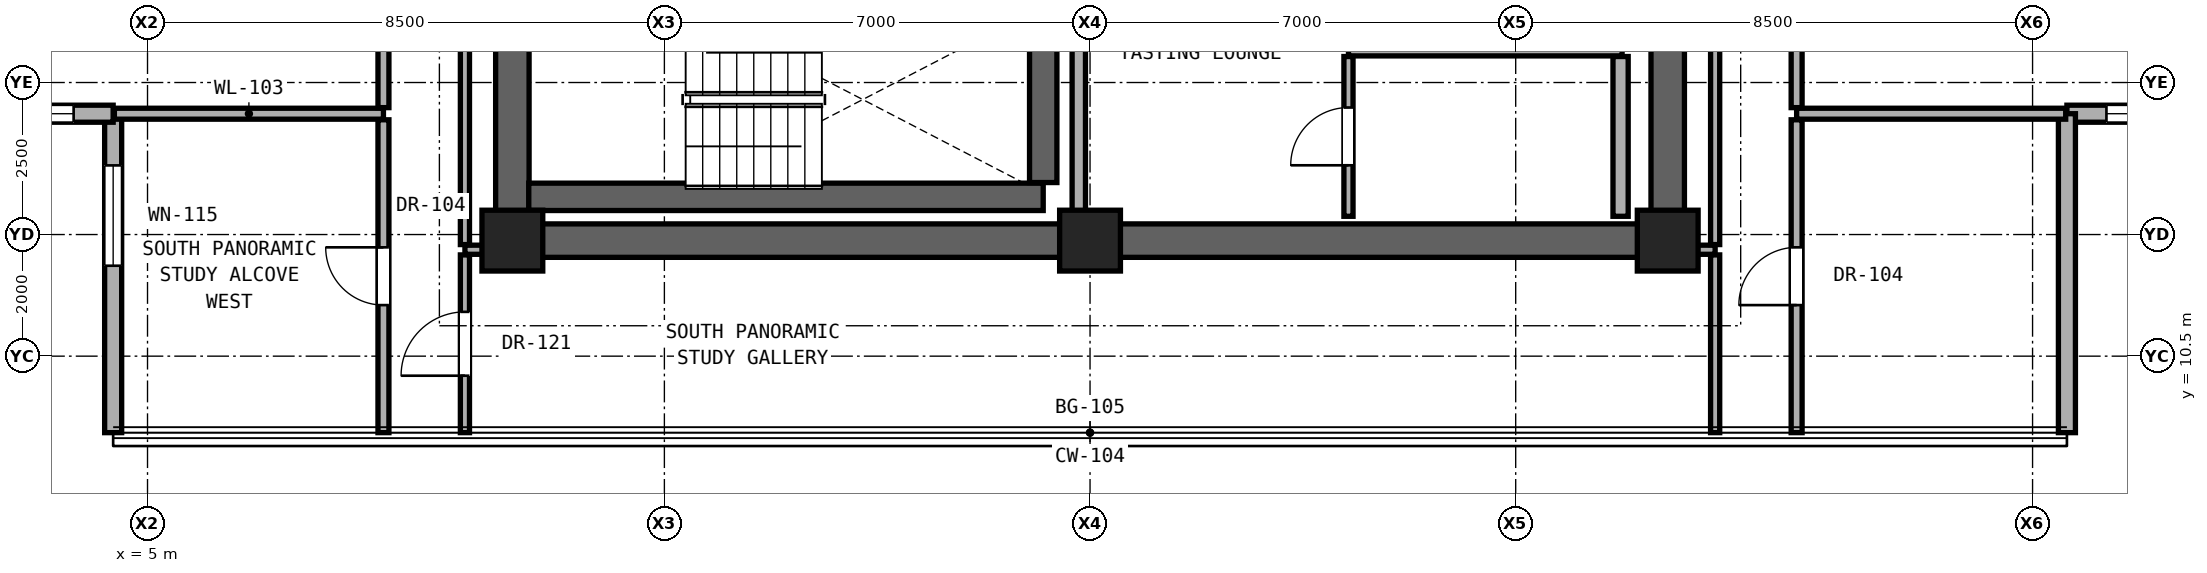
"""IFC4 building model, lengths in metres.
Left out: names, types, materials, properties, quantities, classifications, styles, units other than length and angle.
Written with IfcOpenShell. Run it as: python <this file> out.ifc"""

import sys

from ifc_helpers import new_model, si_unit, direction, frame, frame_2d, origin, origin_2d, place, context, subcontext, project, spatial, rectangle, extrude, element, fill, save


model = new_model("IFC4")
c1 = context("Model", 3, precision=1e-05, world=origin(), true_north=direction((0.0, 1.0)))
c2 = subcontext(c1, "Body", "Model", "MODEL_VIEW")
j1 = project(units=[si_unit("LENGTHUNIT", "METRE"), si_unit("PLANEANGLEUNIT", "RADIAN")], contexts=[c1])
p1 = place(None, origin())
s1 = spatial("IfcSite", under=j1, at=p1, CompositionType="ELEMENT")
p2 = place(p1, origin())
s2 = spatial("IfcBuilding", under=s1, at=p2, CompositionType="ELEMENT")
p3 = place(p2, frame((0.0, 0.0, 173.9)))
s3 = spatial("IfcBuildingStorey", under=s2, at=p3, CompositionType="ELEMENT", Elevation=173.9)
for number, where, z_axis, x_axis in (
    (1, (11.0, 12.4, 0.0), (0.0, 0.0, 1.0), (1.0, 0.0, 0.0)),
    (2, (20.5, 12.4, 0.0), (0.0, 0.0, 1.0), (1.0, 0.0, 0.0)),
    (3, (30.0, 12.4, 0.0), (0.0, 0.0, 1.0), (1.0, 0.0, 0.0)),
):
    element("IfcColumn", number, at=place(p3, frame(where, z_axis=z_axis, x_axis=x_axis)), inside=s3, PredefinedType="COLUMN", context=c2, shape_type="SweptSolid", body=[
        extrude(rectangle(XDim=1.0, YDim=1.0, at=origin_2d()), origin(), (0.0, 0.0, 1.0), 3.25),
    ])
p4 = place(p3, frame((11.0, 12.4, 0.0), z_axis=(0.0, 0.0, 1.0), x_axis=(1.0, 0.0, 0.0)))
e4 = element("IfcWall", 4, at=p4, inside=s3, PredefinedType="SHEAR", context=c2, shape_type="SweptSolid", body=[
    extrude(rectangle(XDim=19.0, YDim=0.55, at=frame_2d((9.5, 0.0))), origin(), (0.0, 0.0, 1.0), 3.05),
])
for number, where, z_axis, x_axis in (
    (5, (11.0, 12.4, 0.0), (0.0, 0.0, 1.0), (0.0, 1.0, 0.0)),
    (6, (30.0, 12.4, 0.0), (0.0, 0.0, 1.0), (0.0, 1.0, 0.0)),
):
    element("IfcWall", number, at=place(p3, frame(where, z_axis=z_axis, x_axis=x_axis)), inside=s3, PredefinedType="SHEAR", context=c2, shape_type="SweptSolid", body=[
        extrude(rectangle(XDim=6.0, YDim=0.55, at=frame_2d((3.0, 0.0))), origin(), (0.0, 0.0, 1.0), 3.05),
    ])
p5 = place(p3, frame((4.435, 14.487, 0.0), z_axis=(0.0, 0.0, 1.0), x_axis=(0.0, -1.0, 0.0)))
e7 = element("IfcWall", 7, at=p5, inside=s3, PredefinedType="SOLIDWALL", context=c2, shape_type="SweptSolid", body=[
    extrude(rectangle(XDim=5.245, YDim=0.28, at=frame_2d((2.623, 0.0))), origin(), (0.0, 0.0, 1.0), 3.03),
])
p6 = place(p5, frame((0.85, 0.0, 0.68)))
e8 = element("IfcOpeningElement", 8, at=p6, cuts=e7, PredefinedType="OPENING", context=c2, shape_type="SweptSolid", body=[
    extrude(rectangle(XDim=1.65, YDim=2.2, at=frame_2d((0.825, 1.1))), frame((0.0, 0.15, 0.0), z_axis=(0.0, -1.0, 0.0), x_axis=(1.0, 0.0, 0.0)), (0.0, 0.0, 1.0), 0.3),
])
p7 = place(p3, frame((-0.81, 14.487, 0.0), z_axis=(0.0, 0.0, 1.0), x_axis=(1.0, 0.0, 0.0)))
e9 = element("IfcWall", 9, at=p7, inside=s3, PredefinedType="SOLIDWALL", context=c2, shape_type="SweptSolid", body=[
    extrude(rectangle(XDim=5.245, YDim=0.28, at=frame_2d((2.623, 0.0))), origin(), (0.0, 0.0, 1.0), 3.03),
])
p8 = place(p7, frame((3.495, 0.0, 0.85)))
e10 = element("IfcOpeningElement", 10, at=p8, cuts=e9, PredefinedType="OPENING", context=c2, shape_type="SweptSolid", body=[
    extrude(rectangle(XDim=1.1, YDim=2.0, at=frame_2d((0.55, 1.0))), frame((0.0, 0.15, 0.0), z_axis=(0.0, -1.0, 0.0), x_axis=(1.0, 0.0, 0.0)), (0.0, 0.0, 1.0), 0.3),
])
p9 = place(p3, frame((36.565, 14.487, 0.0), z_axis=(0.0, 0.0, 1.0), x_axis=(1.0, 0.0, 0.0)))
e11 = element("IfcWall", 11, at=p9, inside=s3, PredefinedType="SOLIDWALL", context=c2, shape_type="SweptSolid", body=[
    extrude(rectangle(XDim=5.245, YDim=0.28, at=frame_2d((2.623, 0.0))), origin(), (0.0, 0.0, 1.0), 3.03),
])
p10 = place(p9, frame((0.65, 0.0, 0.85)))
e12 = element("IfcOpeningElement", 12, at=p10, cuts=e11, PredefinedType="OPENING", context=c2, shape_type="SweptSolid", body=[
    extrude(rectangle(XDim=1.1, YDim=2.0, at=frame_2d((0.55, 1.0))), frame((0.0, 0.15, 0.0), z_axis=(0.0, -1.0, 0.0), x_axis=(1.0, 0.0, 0.0)), (0.0, 0.0, 1.0), 0.3),
])
p11 = place(p3, frame((36.565, 9.242, 0.0), z_axis=(0.0, 0.0, 1.0), x_axis=(0.0, 1.0, 0.0)))
e13 = element("IfcWall", 13, at=p11, inside=s3, PredefinedType="SOLIDWALL", context=c2, shape_type="SweptSolid", body=[
    extrude(rectangle(XDim=5.245, YDim=0.28, at=frame_2d((2.623, 0.0))), origin(), (0.0, 0.0, 1.0), 3.03),
])
for number, where, z_axis, x_axis in (
    (14, (10.22, 12.25, 0.0), (0.0, 0.0, 1.0), (1.0, 0.0, 0.0)),
    (15, (30.27, 12.25, 0.0), (0.0, 0.0, 1.0), (1.0, 0.0, 0.0)),
):
    element("IfcWall", number, at=place(p3, frame(where, z_axis=z_axis, x_axis=x_axis)), inside=s3, PredefinedType="PARTITIONING", context=c2, shape_type="SweptSolid", body=[
        extrude(rectangle(XDim=0.51, YDim=0.15, at=frame_2d((0.255, 0.0))), origin(), (0.0, 0.0, 1.0), 3.05),
    ])
p12 = place(p3, frame((11.27, 13.12, 0.0), z_axis=(0.0, 0.0, 1.0), x_axis=(1.0, 0.0, 0.0)))
e16 = element("IfcWall", 16, at=p12, inside=s3, PredefinedType="SHEAR", context=c2, shape_type="SweptSolid", body=[
    extrude(rectangle(XDim=8.46, YDim=0.45, at=frame_2d((4.23, 0.0))), origin(), (0.0, 0.0, 1.0), 3.05),
])
for number, where, z_axis, x_axis in (
    (17, (4.455, 14.487, 0.0), (0.0, 0.0, 1.0), (1.0, 0.0, 0.0)),
    (18, (32.12, 14.487, 0.0), (0.0, 0.0, 1.0), (1.0, 0.0, 0.0)),
):
    element("IfcWall", number, at=place(p3, frame(where, z_axis=z_axis, x_axis=x_axis)), inside=s3, PredefinedType="PARTITIONING", context=c2, shape_type="SweptSolid", body=[
        extrude(rectangle(XDim=4.425, YDim=0.18, at=frame_2d((2.212, 0.0))), origin(), (0.0, 0.0, 1.0), 3.05),
    ])
p13 = place(p3, frame((24.75, 15.5, 0.0), z_axis=(0.0, 0.0, 1.0), x_axis=(1.0, 0.0, 0.0)))
e19 = element("IfcWall", 19, at=p13, inside=s3, PredefinedType="PARTITIONING", context=c2, shape_type="SweptSolid", body=[
    extrude(rectangle(XDim=4.5, YDim=0.125, at=frame_2d((2.25, 0.0))), origin(), (0.0, 0.0, 1.0), 3.05),
])
p14 = place(p3, frame((8.88, 9.242, 0.0), z_axis=(0.0, 0.0, 1.0), x_axis=(0.0, 1.0, 0.0)))
e20 = element("IfcWall", 20, at=p14, inside=s3, PredefinedType="PARTITIONING", context=c2, shape_type="SweptSolid", body=[
    extrude(rectangle(XDim=5.145, YDim=0.18, at=frame_2d((2.573, 0.0))), origin(), (0.0, 0.0, 1.0), 3.05),
])
p15 = place(p14, frame((2.097, 0.0, 0.0)))
e21 = element("IfcOpeningElement", 21, at=p15, cuts=e20, PredefinedType="OPENING", context=c2, shape_type="SweptSolid", body=[
    extrude(rectangle(XDim=0.95, YDim=2.15, at=frame_2d((0.475, 1.075))), frame((0.0, 0.1, 0.0), z_axis=(0.0, -1.0, 0.0), x_axis=(1.0, 0.0, 0.0)), (0.0, 0.0, 1.0), 0.2),
])
p16 = place(p3, frame((8.88, 14.587, 0.0), z_axis=(0.0, 0.0, 1.0), x_axis=(0.0, 1.0, 0.0)))
e22 = element("IfcWall", 22, at=p16, inside=s3, PredefinedType="PARTITIONING", context=c2, shape_type="SweptSolid", body=[
    extrude(rectangle(XDim=4.601, YDim=0.18, at=frame_2d((2.301, 0.0))), origin(), (0.0, 0.0, 1.0), 2.442),
])
p17 = place(p16, frame((2.075, 0.0, 0.0)))
e23 = element("IfcOpeningElement", 23, at=p17, cuts=e22, PredefinedType="OPENING", context=c2, shape_type="SweptSolid", body=[
    extrude(rectangle(XDim=1.05, YDim=2.2, at=frame_2d((0.525, 1.1))), frame((0.0, 0.1, 0.0), z_axis=(0.0, -1.0, 0.0), x_axis=(1.0, 0.0, 0.0)), (0.0, 0.0, 1.0), 0.2),
])
p18 = place(p3, frame((10.22, 9.242, 0.0), z_axis=(0.0, 0.0, 1.0), x_axis=(0.0, 1.0, 0.0)))
e24 = element("IfcWall", 24, at=p18, inside=s3, PredefinedType="PARTITIONING", context=c2, shape_type="SweptSolid", body=[
    extrude(rectangle(XDim=2.923, YDim=0.15, at=frame_2d((1.461, 0.0))), origin(), (0.0, 0.0, 1.0), 3.05),
])
p19 = place(p18, frame((0.937, 0.0, 0.0)))
e25 = element("IfcOpeningElement", 25, at=p19, cuts=e24, PredefinedType="OPENING", context=c2, shape_type="SweptSolid", body=[
    extrude(rectangle(XDim=1.05, YDim=2.2, at=frame_2d((0.525, 1.1))), frame((0.0, 0.085, 0.0), z_axis=(0.0, -1.0, 0.0), x_axis=(1.0, 0.0, 0.0)), (0.0, 0.0, 1.0), 0.17),
])
p20 = place(p3, frame((10.22, 12.335, 0.0), z_axis=(0.0, 0.0, 1.0), x_axis=(0.0, 1.0, 0.0)))
e26 = element("IfcWall", 26, at=p20, inside=s3, PredefinedType="PARTITIONING", context=c2, shape_type="SweptSolid", body=[
    extrude(rectangle(XDim=5.98, YDim=0.15, at=frame_2d((2.99, 0.0))), origin(), (0.0, 0.0, 1.0), 2.442),
])
p21 = place(p3, frame((19.73, 13.355, 0.0), z_axis=(0.0, 0.0, 1.0), x_axis=(0.0, 1.0, 0.0)))
e27 = element("IfcWall", 27, at=p21, inside=s3, PredefinedType="SHEAR", context=c2, shape_type="SweptSolid", body=[
    extrude(rectangle(XDim=2.73, YDim=0.45, at=frame_2d((1.365, 0.0))), origin(), (0.0, 0.0, 1.0), 3.05),
])
p22 = place(p3, frame((20.315, 12.8, 0.0), z_axis=(0.0, 0.0, 1.0), x_axis=(0.0, 1.0, 0.0)))
e28 = element("IfcWall", 28, at=p22, inside=s3, PredefinedType="SOLIDWALL", context=c2, shape_type="SweptSolid", body=[
    extrude(rectangle(XDim=3.285, YDim=0.22, at=frame_2d((1.643, 0.0))), origin(), (0.0, 0.0, 1.0), 3.05),
])
p23 = place(p3, frame((24.75, 12.8, 0.0), z_axis=(0.0, 0.0, 1.0), x_axis=(0.0, 1.0, 0.0)))
e29 = element("IfcWall", 29, at=p23, inside=s3, PredefinedType="PARTITIONING", context=c2, shape_type="SweptSolid", body=[
    extrude(rectangle(XDim=2.627, YDim=0.15, at=frame_2d((1.314, 0.0))), origin(), (0.0, 0.0, 1.0), 3.05),
])
p24 = place(p23, frame((0.839, 0.0, 0.0)))
e30 = element("IfcOpeningElement", 30, at=p24, cuts=e29, PredefinedType="OPENING", context=c2, shape_type="SweptSolid", body=[
    extrude(rectangle(XDim=0.95, YDim=2.15, at=frame_2d((0.475, 1.075))), frame((0.0, 0.085, 0.0), z_axis=(0.0, -1.0, 0.0), x_axis=(1.0, 0.0, 0.0)), (0.0, 0.0, 1.0), 0.17),
])
p25 = place(p3, frame((29.225, 12.8, 0.0), z_axis=(0.0, 0.0, 1.0), x_axis=(0.0, 1.0, 0.0)))
e31 = element("IfcWall", 31, at=p25, inside=s3, PredefinedType="SOLIDWALL", context=c2, shape_type="SweptSolid", body=[
    extrude(rectangle(XDim=2.627, YDim=0.25, at=frame_2d((1.314, 0.0))), origin(), (0.0, 0.0, 1.0), 3.05),
])
p26 = place(p3, frame((30.78, 9.242, 0.0), z_axis=(0.0, 0.0, 1.0), x_axis=(0.0, 1.0, 0.0)))
e32 = element("IfcWall", 32, at=p26, inside=s3, PredefinedType="PARTITIONING", context=c2, shape_type="SweptSolid", body=[
    extrude(rectangle(XDim=2.923, YDim=0.15, at=frame_2d((1.461, 0.0))), origin(), (0.0, 0.0, 1.0), 3.05),
])
p27 = place(p3, frame((30.78, 12.335, 0.0), z_axis=(0.0, 0.0, 1.0), x_axis=(0.0, 1.0, 0.0)))
e33 = element("IfcWall", 33, at=p27, inside=s3, PredefinedType="PARTITIONING", context=c2, shape_type="SweptSolid", body=[
    extrude(rectangle(XDim=5.98, YDim=0.15, at=frame_2d((2.99, 0.0))), origin(), (0.0, 0.0, 1.0), 2.442),
])
p28 = place(p3, frame((32.12, 9.242, 0.0), z_axis=(0.0, 0.0, 1.0), x_axis=(0.0, 1.0, 0.0)))
e34 = element("IfcWall", 34, at=p28, inside=s3, PredefinedType="PARTITIONING", context=c2, shape_type="SweptSolid", body=[
    extrude(rectangle(XDim=5.145, YDim=0.18, at=frame_2d((2.573, 0.0))), origin(), (0.0, 0.0, 1.0), 3.05),
])
p29 = place(p28, frame((2.097, 0.0, 0.0)))
e35 = element("IfcOpeningElement", 35, at=p29, cuts=e34, PredefinedType="OPENING", context=c2, shape_type="SweptSolid", body=[
    extrude(rectangle(XDim=0.95, YDim=2.15, at=frame_2d((0.475, 1.075))), frame((0.0, 0.1, 0.0), z_axis=(0.0, -1.0, 0.0), x_axis=(1.0, 0.0, 0.0)), (0.0, 0.0, 1.0), 0.2),
])
p30 = place(p3, frame((32.12, 14.587, 0.0), z_axis=(0.0, 0.0, 1.0), x_axis=(0.0, 1.0, 0.0)))
e36 = element("IfcWall", 36, at=p30, inside=s3, PredefinedType="PARTITIONING", context=c2, shape_type="SweptSolid", body=[
    extrude(rectangle(XDim=4.601, YDim=0.18, at=frame_2d((2.301, 0.0))), origin(), (0.0, 0.0, 1.0), 2.442),
])
p31 = place(p30, frame((2.075, 0.0, 0.0)))
e37 = element("IfcOpeningElement", 37, at=p31, cuts=e36, PredefinedType="OPENING", context=c2, shape_type="SweptSolid", body=[
    extrude(rectangle(XDim=1.05, YDim=2.2, at=frame_2d((0.525, 1.1))), frame((0.0, 0.1, 0.0), z_axis=(0.0, -1.0, 0.0), x_axis=(1.0, 0.0, 0.0)), (0.0, 0.0, 1.0), 0.2),
])
p32 = place(p6, origin())
e38 = element("IfcWindow", 38, at=p32, inside=s3, PartitioningType="SINGLE_PANEL", PredefinedType="WINDOW", context=c2, shape_type="SweptSolid", body=[
    extrude(rectangle(XDim=1.65, YDim=2.2, at=frame_2d((0.825, 1.1))), frame((0.0, 0.03, 0.0), z_axis=(0.0, -1.0, 0.0), x_axis=(1.0, 0.0, 0.0)), (0.0, 0.0, 1.0), 0.06),
])
fill(e8, e38)
p33 = place(p8, origin())
e39 = element("IfcWindow", 39, at=p33, inside=s3, PartitioningType="SINGLE_PANEL", PredefinedType="WINDOW", context=c2, shape_type="SweptSolid", body=[
    extrude(rectangle(XDim=1.1, YDim=2.0, at=frame_2d((0.55, 1.0))), frame((0.0, 0.03, 0.0), z_axis=(0.0, -1.0, 0.0), x_axis=(1.0, 0.0, 0.0)), (0.0, 0.0, 1.0), 0.06),
])
fill(e10, e39)
p34 = place(p10, origin())
e40 = element("IfcWindow", 40, at=p34, inside=s3, PartitioningType="SINGLE_PANEL", PredefinedType="WINDOW", context=c2, shape_type="SweptSolid", body=[
    extrude(rectangle(XDim=1.1, YDim=2.0, at=frame_2d((0.55, 1.0))), frame((0.0, 0.03, 0.0), z_axis=(0.0, -1.0, 0.0), x_axis=(1.0, 0.0, 0.0)), (0.0, 0.0, 1.0), 0.06),
])
fill(e12, e40)
p35 = place(p24, origin())
e41 = element("IfcDoor", 41, at=p35, inside=s3, OperationType="SINGLE_SWING_LEFT", PredefinedType="DOOR", context=c2, shape_type="SweptSolid", body=[
    extrude(rectangle(XDim=0.95, YDim=2.15, at=frame_2d((0.475, 1.075))), frame((0.0, 0.025, 0.0), z_axis=(0.0, -1.0, 0.0), x_axis=(1.0, 0.0, 0.0)), (0.0, 0.0, 1.0), 0.05),
])
fill(e30, e41)
p36 = place(p19, origin())
e42 = element("IfcDoor", 42, at=p36, inside=s3, OperationType="SINGLE_SWING_LEFT", PredefinedType="DOOR", context=c2, shape_type="SweptSolid", body=[
    extrude(rectangle(XDim=1.05, YDim=2.2, at=frame_2d((0.525, 1.1))), frame((0.0, 0.025, 0.0), z_axis=(0.0, -1.0, 0.0), x_axis=(1.0, 0.0, 0.0)), (0.0, 0.0, 1.0), 0.05),
])
fill(e25, e42)
p37 = place(p15, origin())
e43 = element("IfcDoor", 43, at=p37, inside=s3, OperationType="SINGLE_SWING_RIGHT", PredefinedType="DOOR", context=c2, shape_type="SweptSolid", body=[
    extrude(rectangle(XDim=0.95, YDim=2.15, at=frame_2d((0.475, 1.075))), frame((0.0, 0.025, 0.0), z_axis=(0.0, -1.0, 0.0), x_axis=(1.0, 0.0, 0.0)), (0.0, 0.0, 1.0), 0.05),
])
fill(e21, e43)
p38 = place(p29, origin())
e44 = element("IfcDoor", 44, at=p38, inside=s3, OperationType="SINGLE_SWING_LEFT", PredefinedType="DOOR", context=c2, shape_type="SweptSolid", body=[
    extrude(rectangle(XDim=0.95, YDim=2.15, at=frame_2d((0.475, 1.075))), frame((0.0, 0.025, 0.0), z_axis=(0.0, -1.0, 0.0), x_axis=(1.0, 0.0, 0.0)), (0.0, 0.0, 1.0), 0.05),
])
fill(e35, e44)
save(model, sys.argv[1])
